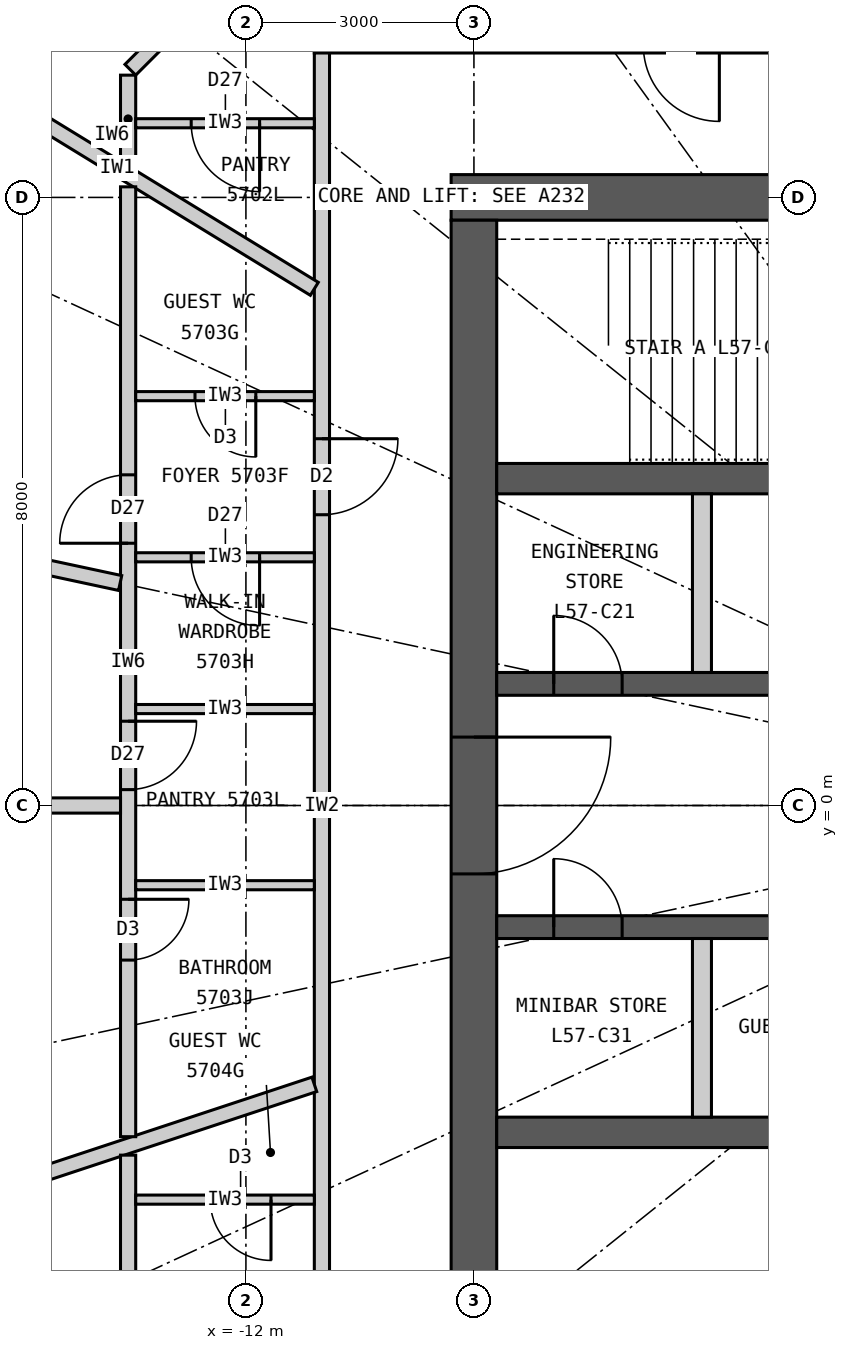
"""IFC4 building model, lengths in metres.
Left out: names, types, materials, properties, quantities, classifications, styles, units other than length and angle.
Written with IfcOpenShell. Run it as: python <this file> out.ifc"""

import sys

from ifc_helpers import new_model, si_unit, direction, frame, frame_2d, origin, place, context, subcontext, project, spatial, rectangle, extrude, element, fill, save


model = new_model("IFC4")
c1 = context("Model", 3, precision=1e-05, world=origin(), true_north=direction((0.0, 1.0)))
c2 = subcontext(c1, "Body", "Model", "MODEL_VIEW")
j1 = project(units=[si_unit("LENGTHUNIT", "METRE"), si_unit("PLANEANGLEUNIT", "RADIAN")], contexts=[c1])
p1 = place(None, origin())
s1 = spatial("IfcSite", under=j1, at=p1, CompositionType="ELEMENT")
p2 = place(p1, origin())
s2 = spatial("IfcBuilding", under=s1, at=p2, CompositionType="ELEMENT")
p3 = place(p2, frame((0.0, 0.0, 212.7)))
s3 = spatial("IfcBuildingStorey", under=s2, at=p3, CompositionType="ELEMENT", Elevation=212.7)
p4 = place(p3, frame((-9.3, 8.0, 0.0), z_axis=(0.0, 0.0, 1.0), x_axis=(1.0, 0.0, 0.0)))
e1 = element("IfcWall", 1, at=p4, inside=s3, PredefinedType="SHEAR", context=c2, shape_type="SweptSolid", body=[
    extrude(rectangle(XDim=18.6, YDim=0.6, at=frame_2d((9.3, 0.0))), origin(), (0.0, 0.0, 1.0), 3.3),
])
p5 = place(p4, frame((8.0, 0.0, 0.0)))
e2 = element("IfcOpeningElement", 2, at=p5, cuts=e1, PredefinedType="OPENING", context=c2, shape_type="SweptSolid", body=[
    extrude(rectangle(XDim=1.2, YDim=2.2, at=frame_2d((0.6, 1.1))), frame((0.0, 0.31, 0.0), z_axis=(0.0, -1.0, 0.0), x_axis=(1.0, 0.0, 0.0)), (0.0, 0.0, 1.0), 0.62),
])
p6 = place(p4, frame((15.6, 0.0, 0.0)))
e3 = element("IfcOpeningElement", 3, at=p6, cuts=e1, PredefinedType="OPENING", context=c2, shape_type="SweptSolid", body=[
    extrude(rectangle(XDim=0.9, YDim=2.2, at=frame_2d((0.45, 1.1))), frame((0.0, 0.31, 0.0), z_axis=(0.0, -1.0, 0.0), x_axis=(1.0, 0.0, 0.0)), (0.0, 0.0, 1.0), 0.62),
])
p7 = place(p3, frame((-9.0, 7.7, 0.0), z_axis=(0.0, 0.0, 1.0), x_axis=(0.0, -1.0, 0.0)))
e4 = element("IfcWall", 4, at=p7, inside=s3, PredefinedType="SHEAR", context=c2, shape_type="SweptSolid", body=[
    extrude(rectangle(XDim=15.4, YDim=0.6, at=frame_2d((7.7, 0.0))), origin(), (0.0, 0.0, 1.0), 3.3),
])
p8 = place(p7, frame((6.8, 0.0, 0.0)))
e5 = element("IfcOpeningElement", 5, at=p8, cuts=e4, PredefinedType="OPENING", context=c2, shape_type="SweptSolid", body=[
    extrude(rectangle(XDim=1.8, YDim=2.2, at=frame_2d((0.9, 1.1))), frame((0.0, 0.31, 0.0), z_axis=(0.0, -1.0, 0.0), x_axis=(1.0, 0.0, 0.0)), (0.0, 0.0, 1.0), 0.62),
])
p9 = place(p3, frame((-8.7, 4.3, 0.0), z_axis=(0.0, 0.0, 1.0), x_axis=(1.0, 0.0, 0.0)))
e6 = element("IfcWall", 6, at=p9, inside=s3, PredefinedType="SHEAR", context=c2, shape_type="SweptSolid", body=[
    extrude(rectangle(XDim=17.4, YDim=0.4, at=frame_2d((8.7, 0.0))), origin(), (0.0, 0.0, 1.0), 3.3),
])
p10 = place(p3, frame((-8.7, 1.6, 0.0), z_axis=(0.0, 0.0, 1.0), x_axis=(1.0, 0.0, 0.0)))
e7 = element("IfcWall", 7, at=p10, inside=s3, PredefinedType="SHEAR", context=c2, shape_type="SweptSolid", body=[
    extrude(rectangle(XDim=17.4, YDim=0.3, at=frame_2d((8.7, 0.0))), origin(), (0.0, 0.0, 1.0), 3.3),
])
p11 = place(p10, frame((12.65, 0.0, 0.0)))
e8 = element("IfcOpeningElement", 8, at=p11, cuts=e7, PredefinedType="OPENING", context=c2, shape_type="SweptSolid", body=[
    extrude(rectangle(XDim=1.1, YDim=2.2, at=frame_2d((0.55, 1.1))), frame((0.0, 0.16, 0.0), z_axis=(0.0, -1.0, 0.0), x_axis=(1.0, 0.0, 0.0)), (0.0, 0.0, 1.0), 0.32),
])
p12 = place(p10, frame((0.75, 0.0, 0.0)))
e9 = element("IfcOpeningElement", 9, at=p12, cuts=e7, PredefinedType="OPENING", context=c2, shape_type="SweptSolid", body=[
    extrude(rectangle(XDim=0.9, YDim=2.2, at=frame_2d((0.45, 1.1))), frame((0.0, 0.16, 0.0), z_axis=(0.0, -1.0, 0.0), x_axis=(1.0, 0.0, 0.0)), (0.0, 0.0, 1.0), 0.32),
])
p13 = place(p10, frame((6.75, 0.0, 0.0)))
e10 = element("IfcOpeningElement", 10, at=p13, cuts=e7, PredefinedType="OPENING", context=c2, shape_type="SweptSolid", body=[
    extrude(rectangle(XDim=0.9, YDim=2.2, at=frame_2d((0.45, 1.1))), frame((0.0, 0.16, 0.0), z_axis=(0.0, -1.0, 0.0), x_axis=(1.0, 0.0, 0.0)), (0.0, 0.0, 1.0), 0.32),
])
p14 = place(p3, frame((-8.7, -4.3, 0.0), z_axis=(0.0, 0.0, 1.0), x_axis=(1.0, 0.0, 0.0)))
e11 = element("IfcWall", 11, at=p14, inside=s3, PredefinedType="SHEAR", context=c2, shape_type="SweptSolid", body=[
    extrude(rectangle(XDim=17.4, YDim=0.4, at=frame_2d((8.7, 0.0))), origin(), (0.0, 0.0, 1.0), 3.3),
])
p15 = place(p3, frame((-8.7, -1.6, 0.0), z_axis=(0.0, 0.0, 1.0), x_axis=(1.0, 0.0, 0.0)))
e12 = element("IfcWall", 12, at=p15, inside=s3, PredefinedType="SHEAR", context=c2, shape_type="SweptSolid", body=[
    extrude(rectangle(XDim=17.4, YDim=0.3, at=frame_2d((8.7, 0.0))), origin(), (0.0, 0.0, 1.0), 3.3),
])
p16 = place(p15, frame((9.65, 0.0, 0.0)))
e13 = element("IfcOpeningElement", 13, at=p16, cuts=e12, PredefinedType="OPENING", context=c2, shape_type="SweptSolid", body=[
    extrude(rectangle(XDim=1.1, YDim=2.2, at=frame_2d((0.55, 1.1))), frame((0.0, 0.16, 0.0), z_axis=(0.0, -1.0, 0.0), x_axis=(1.0, 0.0, 0.0)), (0.0, 0.0, 1.0), 0.32),
])
p17 = place(p15, frame((12.4, 0.0, 0.0)))
e14 = element("IfcOpeningElement", 14, at=p17, cuts=e12, PredefinedType="OPENING", context=c2, shape_type="SweptSolid", body=[
    extrude(rectangle(XDim=1.6, YDim=2.4, at=frame_2d((0.8, 1.2))), frame((0.0, 0.16, 0.0), z_axis=(0.0, -1.0, 0.0), x_axis=(1.0, 0.0, 0.0)), (0.0, 0.0, 1.0), 0.32),
])
p18 = place(p15, frame((0.75, 0.0, 0.0)))
e15 = element("IfcOpeningElement", 15, at=p18, cuts=e12, PredefinedType="OPENING", context=c2, shape_type="SweptSolid", body=[
    extrude(rectangle(XDim=0.9, YDim=2.2, at=frame_2d((0.45, 1.1))), frame((0.0, 0.16, 0.0), z_axis=(0.0, -1.0, 0.0), x_axis=(1.0, 0.0, 0.0)), (0.0, 0.0, 1.0), 0.32),
])
p19 = place(p15, frame((5.25, 0.0, 0.0)))
e16 = element("IfcOpeningElement", 16, at=p19, cuts=e12, PredefinedType="OPENING", context=c2, shape_type="SweptSolid", body=[
    extrude(rectangle(XDim=0.9, YDim=2.2, at=frame_2d((0.45, 1.1))), frame((0.0, 0.16, 0.0), z_axis=(0.0, -1.0, 0.0), x_axis=(1.0, 0.0, 0.0)), (0.0, 0.0, 1.0), 0.32),
])
for number, where, z_axis, x_axis in (
    (17, (-6.0, 1.75, 0.0), (0.0, 0.0, 1.0), (0.0, 1.0, 0.0)),
    (18, (-6.0, -4.1, 0.0), (0.0, 0.0, 1.0), (0.0, 1.0, 0.0)),
):
    element("IfcWall", number, at=place(p3, frame(where, z_axis=z_axis, x_axis=x_axis)), inside=s3, PredefinedType="PARTITIONING", context=c2, shape_type="SweptSolid", body=[
        extrude(rectangle(XDim=2.35, YDim=0.25, at=frame_2d((1.175, 0.0))), origin(), (0.0, 0.0, 1.0), 3.3),
    ])
p20 = place(p3, frame((-11.1, 10.0, 0.0), z_axis=(0.0, 0.0, 1.0), x_axis=(1.0, 0.0, 0.0)))
e19 = element("IfcWall", 19, at=p20, inside=s3, PredefinedType="PARTITIONING", context=c2, shape_type="SweptSolid", body=[
    extrude(rectangle(XDim=22.2, YDim=0.2, at=frame_2d((11.1, 0.0))), origin(), (0.0, 0.0, 1.0), 3.12),
])
p21 = place(p20, frame((20.9, 0.0, 0.0)))
e20 = element("IfcOpeningElement", 20, at=p21, cuts=e19, PredefinedType="OPENING", context=c2, shape_type="SweptSolid", body=[
    extrude(rectangle(XDim=1.0, YDim=2.2, at=frame_2d((0.5, 1.1))), frame((0.0, 0.11, 0.0), z_axis=(0.0, -1.0, 0.0), x_axis=(1.0, 0.0, 0.0)), (0.0, 0.0, 1.0), 0.22),
])
p22 = place(p20, frame((4.329, 0.0, 0.0)))
e21 = element("IfcOpeningElement", 21, at=p22, cuts=e19, PredefinedType="OPENING", context=c2, shape_type="SweptSolid", body=[
    extrude(rectangle(XDim=1.0, YDim=2.2, at=frame_2d((0.5, 1.1))), frame((0.0, 0.11, 0.0), z_axis=(0.0, -1.0, 0.0), x_axis=(1.0, 0.0, 0.0)), (0.0, 0.0, 1.0), 0.22),
])
p23 = place(p3, frame((-11.0, 9.9, 0.0), z_axis=(0.0, 0.0, 1.0), x_axis=(0.0, -1.0, 0.0)))
e22 = element("IfcWall", 22, at=p23, inside=s3, PredefinedType="PARTITIONING", context=c2, shape_type="SweptSolid", body=[
    extrude(rectangle(XDim=19.8, YDim=0.2, at=frame_2d((9.9, 0.0))), origin(), (0.0, 0.0, 1.0), 3.12),
])
p24 = place(p23, frame((5.075, 0.0, 0.0)))
e23 = element("IfcOpeningElement", 23, at=p24, cuts=e22, PredefinedType="OPENING", context=c2, shape_type="SweptSolid", body=[
    extrude(rectangle(XDim=1.0, YDim=2.2, at=frame_2d((0.5, 1.1))), frame((0.0, 0.11, 0.0), z_axis=(0.0, -1.0, 0.0), x_axis=(1.0, 0.0, 0.0)), (0.0, 0.0, 1.0), 0.22),
])
p25 = place(p23, frame((18.645, 0.0, 0.0)))
e24 = element("IfcOpeningElement", 24, at=p25, cuts=e22, PredefinedType="OPENING", context=c2, shape_type="SweptSolid", body=[
    extrude(rectangle(XDim=1.0, YDim=2.2, at=frame_2d((0.5, 1.1))), frame((0.0, 0.11, 0.0), z_axis=(0.0, -1.0, 0.0), x_axis=(1.0, 0.0, 0.0)), (0.0, 0.0, 1.0), 0.22),
])
p26 = place(p3, frame((-11.1, 6.797, 0.0), z_axis=(0.0, 0.0, 1.0), x_axis=(-0.852799818179, 0.522237943963, 0.0)))
e25 = element("IfcWall", 25, at=p26, inside=s3, PredefinedType="PARTITIONING", context=c2, shape_type="SweptSolid", body=[
    extrude(rectangle(XDim=6.077, YDim=0.2, at=frame_2d((3.039, 0.0))), origin(), (0.0, 0.0, 1.0), 3.12),
])
p27 = place(p3, frame((-11.1, -3.669, 0.0), z_axis=(0.0, 0.0, 1.0), x_axis=(-0.949476668397, -0.313837627079, 0.0)))
e26 = element("IfcWall", 26, at=p27, inside=s3, PredefinedType="PARTITIONING", context=c2, shape_type="SweptSolid", body=[
    extrude(rectangle(XDim=8.339, YDim=0.2, at=frame_2d((4.169, 0.0))), origin(), (0.0, 0.0, 1.0), 3.12),
])
p28 = place(p3, frame((-10.679, 12.521, 0.0), z_axis=(0.0, 0.0, 1.0), x_axis=(-0.707106781187, -0.707106781187, 0.0)))
e27 = element("IfcWall", 27, at=p28, inside=s3, PredefinedType="PARTITIONING", context=c2, shape_type="SweptSolid", body=[
    extrude(rectangle(XDim=4.019, YDim=0.2, at=frame_2d((2.009, 0.0))), origin(), (0.0, 0.0, 1.0), 3.12),
])
p29 = place(p3, frame((-13.55, 9.609, 0.0), z_axis=(0.0, 0.0, 1.0), x_axis=(0.0, -1.0, 0.0)))
e28 = element("IfcWall", 28, at=p29, inside=s3, PredefinedType="PARTITIONING", context=c2, shape_type="SweptSolid", body=[
    extrude(rectangle(XDim=1.153, YDim=0.2, at=frame_2d((0.576, 0.0))), origin(), (0.0, 0.0, 1.0), 3.12),
])
p30 = place(p3, frame((-11.1, 8.976, 0.0), z_axis=(0.0, 0.0, 1.0), x_axis=(-1.0, 0.0, 0.0)))
e29 = element("IfcWall", 29, at=p30, inside=s3, PredefinedType="PARTITIONING", context=c2, shape_type="SweptSolid", body=[
    extrude(rectangle(XDim=2.35, YDim=0.12, at=frame_2d((1.175, 0.0))), origin(), (0.0, 0.0, 1.0), 3.12),
])
p31 = place(p30, frame((0.72, 0.0, 0.0)))
e30 = element("IfcOpeningElement", 30, at=p31, cuts=e29, PredefinedType="OPENING", context=c2, shape_type="SweptSolid", body=[
    extrude(rectangle(XDim=0.9, YDim=2.1, at=frame_2d((0.45, 1.05))), frame((0.0, 0.07, 0.0), z_axis=(0.0, -1.0, 0.0), x_axis=(1.0, 0.0, 0.0)), (0.0, 0.0, 1.0), 0.14),
])
p32 = place(p3, frame((-13.55, 8.139, 0.0), z_axis=(0.0, 0.0, 1.0), x_axis=(0.0, -1.0, 0.0)))
e31 = element("IfcWall", 31, at=p32, inside=s3, PredefinedType="PARTITIONING", context=c2, shape_type="SweptSolid", body=[
    extrude(rectangle(XDim=12.496, YDim=0.2, at=frame_2d((6.248, 0.0))), origin(), (0.0, 0.0, 1.0), 3.12),
])
p33 = place(p32, frame((7.031, 0.0, 0.0)))
e32 = element("IfcOpeningElement", 32, at=p33, cuts=e31, PredefinedType="OPENING", context=c2, shape_type="SweptSolid", body=[
    extrude(rectangle(XDim=0.9, YDim=2.1, at=frame_2d((0.45, 1.05))), frame((0.0, 0.11, 0.0), z_axis=(0.0, -1.0, 0.0), x_axis=(1.0, 0.0, 0.0)), (0.0, 0.0, 1.0), 0.22),
])
p34 = place(p32, frame((9.373, 0.0, 0.0)))
e33 = element("IfcOpeningElement", 33, at=p34, cuts=e31, PredefinedType="OPENING", context=c2, shape_type="SweptSolid", body=[
    extrude(rectangle(XDim=0.8, YDim=2.1, at=frame_2d((0.4, 1.05))), frame((0.0, 0.11, 0.0), z_axis=(0.0, -1.0, 0.0), x_axis=(1.0, 0.0, 0.0)), (0.0, 0.0, 1.0), 0.22),
])
p35 = place(p32, frame((3.789, 0.0, 0.0)))
e34 = element("IfcOpeningElement", 34, at=p35, cuts=e31, PredefinedType="OPENING", context=c2, shape_type="SweptSolid", body=[
    extrude(rectangle(XDim=0.9, YDim=2.1, at=frame_2d((0.45, 1.05))), frame((0.0, 0.11, 0.0), z_axis=(0.0, -1.0, 0.0), x_axis=(1.0, 0.0, 0.0)), (0.0, 0.0, 1.0), 0.22),
])
p36 = place(p3, frame((-13.655, 2.927, 0.0), z_axis=(0.0, 0.0, 1.0), x_axis=(-0.977790419294, 0.209585056568, 0.0)))
e35 = element("IfcWall", 35, at=p36, inside=s3, PredefinedType="PARTITIONING", context=c2, shape_type="SweptSolid", body=[
    extrude(rectangle(XDim=5.66, YDim=0.2, at=frame_2d((2.83, 0.0))), origin(), (0.0, 0.0, 1.0), 2.42),
])
p37 = place(p36, frame((1.82, 0.0, 0.0)))
e36 = element("IfcOpeningElement", 36, at=p37, cuts=e35, PredefinedType="OPENING", context=c2, shape_type="SweptSolid", body=[
    extrude(rectangle(XDim=0.9, YDim=2.1, at=frame_2d((0.45, 1.05))), frame((0.0, 0.11, 0.0), z_axis=(0.0, -1.0, 0.0), x_axis=(1.0, 0.0, 0.0)), (0.0, 0.0, 1.0), 0.22),
])
p38 = place(p3, frame((-13.65, 0.0, 0.0), z_axis=(0.0, 0.0, 1.0), x_axis=(-1.0, 0.0, 0.0)))
e37 = element("IfcWall", 37, at=p38, inside=s3, PredefinedType="PARTITIONING", context=c2, shape_type="SweptSolid", body=[
    extrude(rectangle(XDim=6.25, YDim=0.2, at=frame_2d((3.125, 0.0))), origin(), (0.0, 0.0, 1.0), 2.37),
])
p39 = place(p38, frame((2.07, 0.0, 0.0)))
e38 = element("IfcOpeningElement", 38, at=p39, cuts=e37, PredefinedType="OPENING", context=c2, shape_type="SweptSolid", body=[
    extrude(rectangle(XDim=0.9, YDim=2.1, at=frame_2d((0.45, 1.05))), frame((0.0, 0.11, 0.0), z_axis=(0.0, -1.0, 0.0), x_axis=(1.0, 0.0, 0.0)), (0.0, 0.0, 1.0), 0.22),
])
p40 = place(p3, frame((-11.1, 5.385, 0.0), z_axis=(0.0, 0.0, 1.0), x_axis=(-1.0, 0.0, 0.0)))
e39 = element("IfcWall", 39, at=p40, inside=s3, PredefinedType="PARTITIONING", context=c2, shape_type="SweptSolid", body=[
    extrude(rectangle(XDim=2.35, YDim=0.12, at=frame_2d((1.175, 0.0))), origin(), (0.0, 0.0, 1.0), 3.12),
])
p41 = place(p40, frame((0.77, 0.0, 0.0)))
e40 = element("IfcOpeningElement", 40, at=p41, cuts=e39, PredefinedType="OPENING", context=c2, shape_type="SweptSolid", body=[
    extrude(rectangle(XDim=0.8, YDim=2.1, at=frame_2d((0.4, 1.05))), frame((0.0, 0.07, 0.0), z_axis=(0.0, -1.0, 0.0), x_axis=(1.0, 0.0, 0.0)), (0.0, 0.0, 1.0), 0.14),
])
p42 = place(p3, frame((-11.1, 3.265, 0.0), z_axis=(0.0, 0.0, 1.0), x_axis=(-1.0, 0.0, 0.0)))
e41 = element("IfcWall", 41, at=p42, inside=s3, PredefinedType="PARTITIONING", context=c2, shape_type="SweptSolid", body=[
    extrude(rectangle(XDim=2.35, YDim=0.12, at=frame_2d((1.175, 0.0))), origin(), (0.0, 0.0, 1.0), 2.42),
])
p43 = place(p42, frame((0.72, 0.0, 0.0)))
e42 = element("IfcOpeningElement", 42, at=p43, cuts=e41, PredefinedType="OPENING", context=c2, shape_type="SweptSolid", body=[
    extrude(rectangle(XDim=0.9, YDim=2.1, at=frame_2d((0.45, 1.05))), frame((0.0, 0.07, 0.0), z_axis=(0.0, -1.0, 0.0), x_axis=(1.0, 0.0, 0.0)), (0.0, 0.0, 1.0), 0.14),
])
for number, where, z_axis, x_axis in (
    (43, (-11.1, 1.269, 0.0), (0.0, 0.0, 1.0), (-1.0, 0.0, 0.0)),
    (44, (-11.1, -1.049, 0.0), (0.0, 0.0, 1.0), (-1.0, 0.0, 0.0)),
):
    element("IfcWall", number, at=place(p3, frame(where, z_axis=z_axis, x_axis=x_axis)), inside=s3, PredefinedType="PARTITIONING", context=c2, shape_type="SweptSolid", body=[
        extrude(rectangle(XDim=2.35, YDim=0.12, at=frame_2d((1.175, 0.0))), origin(), (0.0, 0.0, 1.0), 3.12),
    ])
p44 = place(p3, frame((-13.55, -4.6, 0.0), z_axis=(0.0, 0.0, 1.0), x_axis=(0.0, -1.0, 0.0)))
e45 = element("IfcWall", 45, at=p44, inside=s3, PredefinedType="PARTITIONING", context=c2, shape_type="SweptSolid", body=[
    extrude(rectangle(XDim=5.009, YDim=0.2, at=frame_2d((2.504, 0.0))), origin(), (0.0, 0.0, 1.0), 3.12),
])
p45 = place(p44, frame((2.07, 0.0, 0.0)))
e46 = element("IfcOpeningElement", 46, at=p45, cuts=e45, PredefinedType="OPENING", context=c2, shape_type="SweptSolid", body=[
    extrude(rectangle(XDim=0.9, YDim=2.1, at=frame_2d((0.45, 1.05))), frame((0.0, 0.11, 0.0), z_axis=(0.0, -1.0, 0.0), x_axis=(1.0, 0.0, 0.0)), (0.0, 0.0, 1.0), 0.22),
])
p46 = place(p3, frame((-11.1, -5.185, 0.0), z_axis=(0.0, 0.0, 1.0), x_axis=(-1.0, 0.0, 0.0)))
e47 = element("IfcWall", 47, at=p46, inside=s3, PredefinedType="PARTITIONING", context=c2, shape_type="SweptSolid", body=[
    extrude(rectangle(XDim=2.35, YDim=0.12, at=frame_2d((1.175, 0.0))), origin(), (0.0, 0.0, 1.0), 3.12),
])
p47 = place(p46, frame((0.57, 0.0, 0.0)))
e48 = element("IfcOpeningElement", 48, at=p47, cuts=e47, PredefinedType="OPENING", context=c2, shape_type="SweptSolid", body=[
    extrude(rectangle(XDim=0.8, YDim=2.1, at=frame_2d((0.4, 1.05))), frame((0.0, 0.07, 0.0), z_axis=(0.0, -1.0, 0.0), x_axis=(1.0, 0.0, 0.0)), (0.0, 0.0, 1.0), 0.14),
])
p48 = place(p31, origin())
e49 = element("IfcDoor", 49, at=p48, inside=s3, OperationType="SINGLE_SWING_LEFT", PredefinedType="DOOR", context=c2, shape_type="SweptSolid", body=[
    extrude(rectangle(XDim=0.9, YDim=2.1, at=frame_2d((0.45, 1.05))), frame((0.0, 0.025, 0.0), z_axis=(0.0, -1.0, 0.0), x_axis=(1.0, 0.0, 0.0)), (0.0, 0.0, 1.0), 0.05),
])
fill(e30, e49)
p49 = place(p24, origin())
e50 = element("IfcDoor", 50, at=p49, inside=s3, OperationType="SINGLE_SWING_LEFT", PredefinedType="DOOR", context=c2, shape_type="SweptSolid", body=[
    extrude(rectangle(XDim=1.0, YDim=2.2, at=frame_2d((0.5, 1.1))), frame((0.0, 0.025, 0.0), z_axis=(0.0, -1.0, 0.0), x_axis=(1.0, 0.0, 0.0)), (0.0, 0.0, 1.0), 0.05),
])
fill(e23, e50)
p50 = place(p41, origin())
e51 = element("IfcDoor", 51, at=p50, inside=s3, OperationType="SINGLE_SWING_LEFT", PredefinedType="DOOR", context=c2, shape_type="SweptSolid", body=[
    extrude(rectangle(XDim=0.8, YDim=2.1, at=frame_2d((0.4, 1.05))), frame((0.0, 0.025, 0.0), z_axis=(0.0, -1.0, 0.0), x_axis=(1.0, 0.0, 0.0)), (0.0, 0.0, 1.0), 0.05),
])
fill(e40, e51)
p51 = place(p43, origin())
e52 = element("IfcDoor", 52, at=p51, inside=s3, OperationType="SINGLE_SWING_LEFT", PredefinedType="DOOR", context=c2, shape_type="SweptSolid", body=[
    extrude(rectangle(XDim=0.9, YDim=2.1, at=frame_2d((0.45, 1.05))), frame((0.0, 0.025, 0.0), z_axis=(0.0, -1.0, 0.0), x_axis=(1.0, 0.0, 0.0)), (0.0, 0.0, 1.0), 0.05),
])
fill(e42, e52)
p52 = place(p33, origin())
e53 = element("IfcDoor", 53, at=p52, inside=s3, OperationType="SINGLE_SWING_LEFT", PredefinedType="DOOR", context=c2, shape_type="SweptSolid", body=[
    extrude(rectangle(XDim=0.9, YDim=2.1, at=frame_2d((0.45, 1.05))), frame((0.0, 0.025, 0.0), z_axis=(0.0, -1.0, 0.0), x_axis=(1.0, 0.0, 0.0)), (0.0, 0.0, 1.0), 0.05),
])
fill(e32, e53)
p53 = place(p34, origin())
e54 = element("IfcDoor", 54, at=p53, inside=s3, OperationType="SINGLE_SWING_LEFT", PredefinedType="DOOR", context=c2, shape_type="SweptSolid", body=[
    extrude(rectangle(XDim=0.8, YDim=2.1, at=frame_2d((0.4, 1.05))), frame((0.0, 0.025, 0.0), z_axis=(0.0, -1.0, 0.0), x_axis=(1.0, 0.0, 0.0)), (0.0, 0.0, 1.0), 0.05),
])
fill(e33, e54)
p54 = place(p35, origin())
e55 = element("IfcDoor", 55, at=p54, inside=s3, OperationType="SINGLE_SWING_RIGHT", PredefinedType="DOOR", context=c2, shape_type="SweptSolid", body=[
    extrude(rectangle(XDim=0.9, YDim=2.1, at=frame_2d((0.45, 1.05))), frame((0.0, 0.025, 0.0), z_axis=(0.0, -1.0, 0.0), x_axis=(1.0, 0.0, 0.0)), (0.0, 0.0, 1.0), 0.05),
])
fill(e34, e55)
p55 = place(p47, origin())
e56 = element("IfcDoor", 56, at=p55, inside=s3, OperationType="SINGLE_SWING_LEFT", PredefinedType="DOOR", context=c2, shape_type="SweptSolid", body=[
    extrude(rectangle(XDim=0.8, YDim=2.1, at=frame_2d((0.4, 1.05))), frame((0.0, 0.025, 0.0), z_axis=(0.0, -1.0, 0.0), x_axis=(1.0, 0.0, 0.0)), (0.0, 0.0, 1.0), 0.05),
])
fill(e48, e56)
p56 = place(p12, origin())
e57 = element("IfcDoor", 57, at=p56, inside=s3, OperationType="SINGLE_SWING_LEFT", PredefinedType="DOOR", context=c2, shape_type="SweptSolid", body=[
    extrude(rectangle(XDim=0.9, YDim=2.2, at=frame_2d((0.45, 1.1))), frame((0.0, 0.025, 0.0), z_axis=(0.0, -1.0, 0.0), x_axis=(1.0, 0.0, 0.0)), (0.0, 0.0, 1.0), 0.05),
])
fill(e9, e57)
p57 = place(p18, origin())
e58 = element("IfcDoor", 58, at=p57, inside=s3, OperationType="SINGLE_SWING_LEFT", PredefinedType="DOOR", context=c2, shape_type="SweptSolid", body=[
    extrude(rectangle(XDim=0.9, YDim=2.2, at=frame_2d((0.45, 1.1))), frame((0.0, 0.025, 0.0), z_axis=(0.0, -1.0, 0.0), x_axis=(1.0, 0.0, 0.0)), (0.0, 0.0, 1.0), 0.05),
])
fill(e15, e58)
p58 = place(p8, origin())
e59 = element("IfcDoor", 59, at=p58, inside=s3, OperationType="DOUBLE_DOOR_DOUBLE_SWING", PredefinedType="DOOR", context=c2, shape_type="SweptSolid", body=[
    extrude(rectangle(XDim=1.8, YDim=2.2, at=frame_2d((0.9, 1.1))), frame((0.0, 0.025, 0.0), z_axis=(0.0, -1.0, 0.0), x_axis=(1.0, 0.0, 0.0)), (0.0, 0.0, 1.0), 0.05),
])
fill(e5, e59)
save(model, sys.argv[1])
